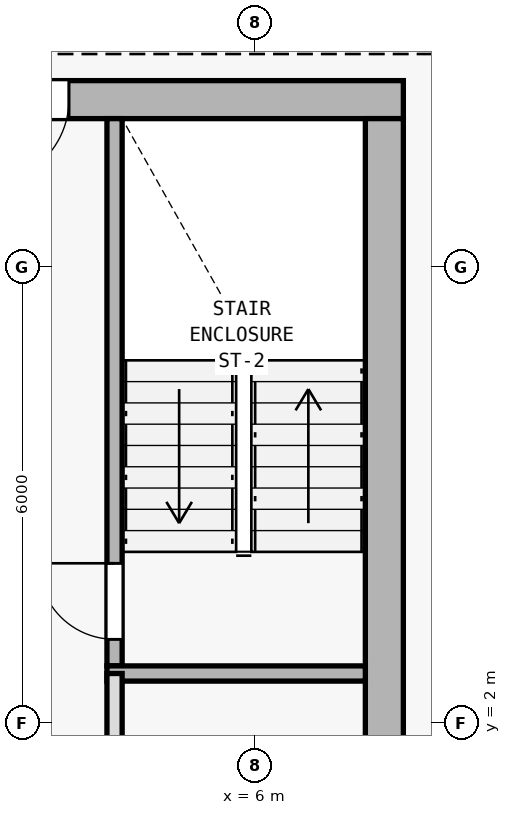
"""IFC4 building model, lengths in metres.
Left out: names, types, materials, properties, quantities, classifications, styles, units other than length and angle.
Written with IfcOpenShell. Run it as: python <this file> out.ifc"""

import sys

from ifc_helpers import new_model, si_unit, direction, frame, frame_2d, origin, origin_2d, place, context, subcontext, project, spatial, rectangle, i_section, extrude, element, fill, save


model = new_model("IFC4")
c1 = context("Model", 3, precision=1e-05, world=origin(), true_north=direction((0.0, 1.0)))
c2 = subcontext(c1, "Body", "Model", "MODEL_VIEW")
j1 = project(units=[si_unit("LENGTHUNIT", "METRE"), si_unit("PLANEANGLEUNIT", "RADIAN")], contexts=[c1])
p1 = place(None, origin())
s1 = spatial("IfcSite", under=j1, at=p1, CompositionType="ELEMENT")
p2 = place(p1, origin())
s2 = spatial("IfcBuilding", under=s1, at=p2, CompositionType="ELEMENT")
p3 = place(p2, frame((0.0, 0.0, 178.2)))
s3 = spatial("IfcBuildingStorey", under=s2, at=p3, CompositionType="ELEMENT", Elevation=178.2)
p4 = place(p3, frame((7.7, 10.2, 0.0), z_axis=(0.0, 0.0, 1.0), x_axis=(1.0, 0.0, 0.0)))
e1 = element("IfcColumn", 1, at=p4, inside=s3, PredefinedType="COLUMN", context=c2, shape_type="SweptSolid", body=[
    extrude(i_section(OverallWidth=0.404, OverallDepth=0.407, WebThickness=0.017, FlangeThickness=0.028, FilletRadius=0.015, at=origin_2d()), origin(), (0.0, 0.0, 1.0), 3.6),
])
p5 = place(p3, frame((7.95, 10.2, 0.0), z_axis=(0.0, 0.0, 1.0), x_axis=(-1.0, 0.0, 0.0)))
e2 = element("IfcWall", 2, at=p5, inside=s3, PredefinedType="SHEAR", context=c2, shape_type="SweptSolid", body=[
    extrude(rectangle(XDim=15.9, YDim=0.5, at=frame_2d((7.95, 0.0))), origin(), (0.0, 0.0, 1.0), 3.35),
])
p6 = place(p5, frame((4.4, 0.0, 0.0)))
e3 = element("IfcOpeningElement", 3, at=p6, cuts=e2, PredefinedType="OPENING", context=c2, shape_type="SweptSolid", body=[
    extrude(rectangle(XDim=1.1, YDim=2.15, at=frame_2d((0.55, 1.075))), frame((0.0, 0.26, 0.0), z_axis=(0.0, -1.0, 0.0), x_axis=(1.0, 0.0, 0.0)), (0.0, 0.0, 1.0), 0.52),
])
p7 = place(p3, frame((7.7, 9.95, 0.0), z_axis=(0.0, 0.0, 1.0), x_axis=(0.0, -1.0, 0.0)))
e4 = element("IfcWall", 4, at=p7, inside=s3, PredefinedType="SHEAR", context=c2, shape_type="SweptSolid", body=[
    extrude(rectangle(XDim=19.1, YDim=0.5, at=frame_2d((9.55, 0.0))), origin(), (0.0, 0.0, 1.0), 3.35),
])
p8 = place(p3, frame((4.15, 2.75, 0.0), z_axis=(0.0, 0.0, 1.0), x_axis=(0.0, 1.0, 0.0)))
e5 = element("IfcWall", 5, at=p8, inside=s3, PredefinedType="SOLIDWALL", context=c2, shape_type="SweptSolid", body=[
    extrude(rectangle(XDim=7.2, YDim=0.2, at=frame_2d((3.6, 0.0))), origin(), (0.0, 0.0, 1.0), 3.35),
])
p9 = place(p8, frame((0.35, 0.0, 0.0)))
e6 = element("IfcOpeningElement", 6, at=p9, cuts=e5, PredefinedType="OPENING", context=c2, shape_type="SweptSolid", body=[
    extrude(rectangle(XDim=1.0, YDim=2.15, at=frame_2d((0.5, 1.075))), frame((0.0, 0.11, 0.0), z_axis=(0.0, -1.0, 0.0), x_axis=(1.0, 0.0, 0.0)), (0.0, 0.0, 1.0), 0.22),
])
p10 = place(p3, frame((4.05, 2.65, 0.0), z_axis=(0.0, 0.0, 1.0), x_axis=(1.0, 0.0, 0.0)))
e7 = element("IfcWall", 7, at=p10, inside=s3, PredefinedType="SOLIDWALL", context=c2, shape_type="SweptSolid", body=[
    extrude(rectangle(XDim=3.4, YDim=0.2, at=frame_2d((1.7, 0.0))), origin(), (0.0, 0.0, 1.0), 3.35),
])
p11 = place(p3, frame((4.15, -6.05, 0.0), z_axis=(0.0, 0.0, 1.0), x_axis=(0.0, 1.0, 0.0)))
e8 = element("IfcWall", 8, at=p11, inside=s3, PredefinedType="SOLIDWALL", context=c2, shape_type="SweptSolid", body=[
    extrude(rectangle(XDim=8.7, YDim=0.2, at=frame_2d((4.35, 0.0))), origin(), (0.0, 0.0, 1.0), 3.35),
])
p12 = place(p11, frame((3.6, 0.0, 0.0)))
e9 = element("IfcOpeningElement", 9, at=p12, cuts=e8, PredefinedType="OPENING", context=c2, shape_type="SweptSolid", body=[
    extrude(rectangle(XDim=0.95, YDim=2.1, at=frame_2d((0.475, 1.05))), frame((0.0, 0.11, 0.0), z_axis=(0.0, -1.0, 0.0), x_axis=(1.0, 0.0, 0.0)), (0.0, 0.0, 1.0), 0.22),
])
p13 = place(p3, frame((7.023, 12.36, 0.0), z_axis=(0.0, 0.0, 1.0), x_axis=(0.84376480085, -0.536713108511, 0.0)))
e10 = element("IfcWall", 10, at=p13, inside=s3, PredefinedType="PARTITIONING", context=c2, shape_type="SweptSolid", body=[
    extrude(rectangle(XDim=7.297, YDim=0.15, at=frame_2d((3.648, 0.0))), origin(), (0.0, 0.0, 1.0), 2.725),
])
p14 = place(p13, frame((2.44, 0.0, 0.0)))
e11 = element("IfcOpeningElement", 11, at=p14, cuts=e10, PredefinedType="OPENING", context=c2, shape_type="SweptSolid", body=[
    extrude(rectangle(XDim=0.9, YDim=2.1, at=frame_2d((0.45, 1.05))), frame((0.0, 0.085, 0.0), z_axis=(0.0, -1.0, 0.0), x_axis=(1.0, 0.0, 0.0)), (0.0, 0.0, 1.0), 0.17),
])
p15 = place(p6, origin())
e12 = element("IfcDoor", 12, at=p15, inside=s3, OperationType="SINGLE_SWING_RIGHT", PredefinedType="DOOR", context=c2, shape_type="SweptSolid", body=[
    extrude(rectangle(XDim=1.1, YDim=2.15, at=frame_2d((0.55, 1.075))), frame((0.0, 0.025, 0.0), z_axis=(0.0, -1.0, 0.0), x_axis=(1.0, 0.0, 0.0)), (0.0, 0.0, 1.0), 0.05),
])
fill(e3, e12)
p16 = place(p9, origin())
e13 = element("IfcDoor", 13, at=p16, inside=s3, OperationType="SINGLE_SWING_RIGHT", PredefinedType="DOOR", context=c2, shape_type="SweptSolid", body=[
    extrude(rectangle(XDim=1.0, YDim=2.15, at=frame_2d((0.5, 1.075))), frame((0.0, 0.025, 0.0), z_axis=(0.0, -1.0, 0.0), x_axis=(1.0, 0.0, 0.0)), (0.0, 0.0, 1.0), 0.05),
])
fill(e6, e13)
save(model, sys.argv[1])
